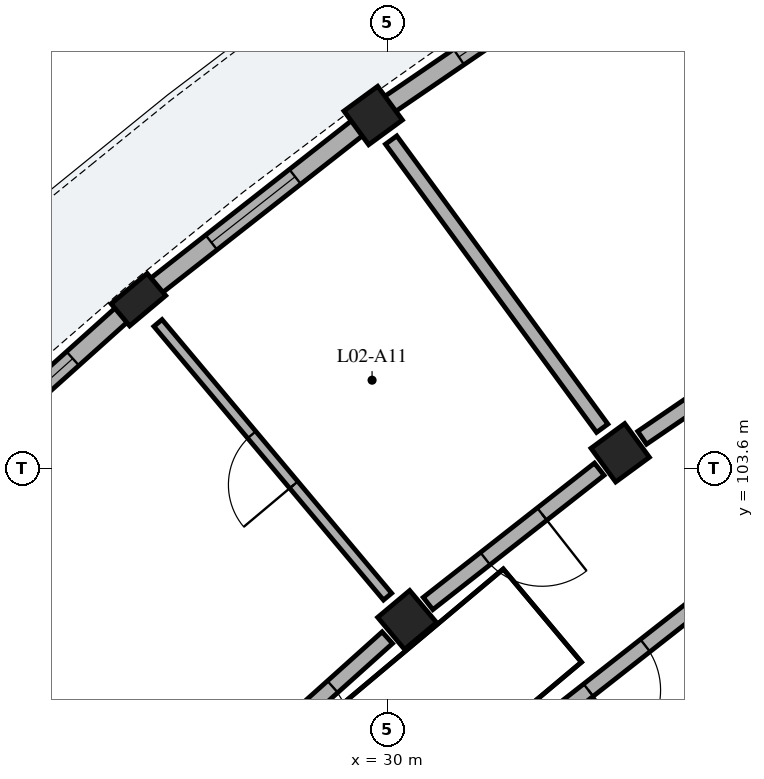
"""IFC4 building model, lengths in metres.
Left out: names, types, materials, properties, quantities, classifications, styles, units other than length and angle.
Written with IfcOpenShell. Run it as: python <this file> out.ifc"""

import sys

from ifc_helpers import new_model, si_unit, direction, frame, frame_2d, origin, origin_2d, place, context, subcontext, project, spatial, rectangle, extrude, element, fill, save


model = new_model("IFC4")
c1 = context("Model", 3, precision=1e-05, world=origin(), true_north=direction((0.0, 1.0)))
c2 = subcontext(c1, "Body", "Model", "MODEL_VIEW")
j1 = project(units=[si_unit("LENGTHUNIT", "METRE"), si_unit("PLANEANGLEUNIT", "RADIAN")], contexts=[c1])
p1 = place(None, origin())
s1 = spatial("IfcSite", under=j1, at=p1, CompositionType="ELEMENT")
p2 = place(p1, origin())
s2 = spatial("IfcBuilding", under=s1, at=p2, CompositionType="ELEMENT")
p3 = place(p2, frame((0.0, 0.0, 8.84)))
s3 = spatial("IfcBuildingStorey", under=s2, at=p3, CompositionType="ELEMENT", Elevation=8.84)
for number, where, z_axis, x_axis in (
    (1, (33.061, 103.804, 0.0), (0.0, 0.0, 1.0), (-0.591, 0.807, 0.0)),
    (2, (29.811, 108.241, 0.0), (0.0, 0.0, 1.0), (-0.591, 0.807, 0.0)),
    (3, (30.257, 101.605, 0.0), (0.0, 0.0, 1.0), (-0.643, 0.766, 0.0)),
):
    element("IfcColumn", number, at=place(p3, frame(where, z_axis=z_axis, x_axis=x_axis)), inside=s3, PredefinedType="COLUMN", context=c2, shape_type="SweptSolid", body=[
        extrude(rectangle(XDim=0.55, YDim=0.55, at=origin_2d()), origin(), (0.0, 0.0, 1.0), 3.105),
    ])
p4 = place(p3, frame((26.722, 105.818, 0.0), z_axis=(0.0, 0.0, 1.0), x_axis=(-0.642787636427, 0.766044420681, 0.0)))
e4 = element("IfcColumn", 4, at=p4, inside=s3, PredefinedType="PILASTER", context=c2, shape_type="SweptSolid", body=[
    extrude(rectangle(XDim=0.38, YDim=0.62, at=origin_2d()), origin(), (0.0, 0.0, 1.0), 3.105),
])
p5 = place(p3, frame((32.92, 110.365, 0.0), z_axis=(0.0, 0.0, 1.0), x_axis=(-0.825745840472, -0.56404238045, 0.0)))
e5 = element("IfcWall", 5, at=p5, inside=s3, PredefinedType="SOLIDWALL", context=c2, shape_type="SweptSolid", body=[
    extrude(rectangle(XDim=3.521, YDim=0.245, at=frame_2d((1.76, 0.0))), origin(), (0.0, 0.0, 1.0), 2.355),
])
p6 = place(p5, frame((1.12, 0.0, 0.55)))
e6 = element("IfcOpeningElement", 6, at=p6, cuts=e5, PredefinedType="OPENING", context=c2, shape_type="SweptSolid", body=[
    extrude(rectangle(XDim=1.28, YDim=1.56, at=frame_2d((0.64, 0.78))), frame((0.0, 0.133, 0.0), z_axis=(0.0, -1.0, 0.0), x_axis=(1.0, 0.0, 0.0)), (0.0, 0.0, 1.0), 0.265),
])
p7 = place(p3, frame((29.618, 108.09, 0.0), z_axis=(0.0, 0.0, 1.0), x_axis=(-0.786813798172, -0.617190446301, 0.0)))
e7 = element("IfcWall", 7, at=p7, inside=s3, PredefinedType="SOLIDWALL", context=c2, shape_type="SweptSolid", body=[
    extrude(rectangle(XDim=3.521, YDim=0.245, at=frame_2d((1.76, 0.0))), origin(), (0.0, 0.0, 1.0), 2.355),
])
p8 = place(p7, frame((1.06, 0.0, 0.55)))
e8 = element("IfcOpeningElement", 8, at=p8, cuts=e7, PredefinedType="OPENING", context=c2, shape_type="SweptSolid", body=[
    extrude(rectangle(XDim=1.4, YDim=1.635, at=frame_2d((0.7, 0.817))), frame((0.0, 0.133, 0.0), z_axis=(0.0, -1.0, 0.0), x_axis=(1.0, 0.0, 0.0)), (0.0, 0.0, 1.0), 0.265),
])
p9 = place(p3, frame((26.603, 105.711, 0.0), z_axis=(0.0, 0.0, 1.0), x_axis=(-0.744413726571, -0.667718656092, 0.0)))
e9 = element("IfcWall", 9, at=p9, inside=s3, PredefinedType="SOLIDWALL", context=c2, shape_type="SweptSolid", body=[
    extrude(rectangle(XDim=3.521, YDim=0.245, at=frame_2d((1.76, 0.0))), origin(), (0.0, 0.0, 1.0), 2.355),
])
p10 = place(p9, frame((1.0, 0.0, 0.55)))
e10 = element("IfcOpeningElement", 10, at=p10, cuts=e9, PredefinedType="OPENING", context=c2, shape_type="SweptSolid", body=[
    extrude(rectangle(XDim=1.52, YDim=1.485, at=frame_2d((0.76, 0.743))), frame((0.0, 0.133, 0.0), z_axis=(0.0, -1.0, 0.0), x_axis=(1.0, 0.0, 0.0)), (0.0, 0.0, 1.0), 0.265),
])
p11 = place(p3, frame((35.714, 105.616, 0.0), z_axis=(0.0, 0.0, 1.0), x_axis=(-0.825779671787, -0.563992848947, 0.0)))
e11 = element("IfcWall", 11, at=p11, inside=s3, PredefinedType="PARTITIONING", context=c2, shape_type="SweptSolid", body=[
    extrude(rectangle(XDim=2.863, YDim=0.205, at=frame_2d((1.432, 0.0))), origin(), (0.0, 0.0, 1.0), 2.37),
])
p12 = place(p11, frame((0.947, 0.0, 0.0)))
e12 = element("IfcOpeningElement", 12, at=p12, cuts=e11, PredefinedType="OPENING", context=c2, shape_type="SweptSolid", body=[
    extrude(rectangle(XDim=0.97, YDim=2.15, at=frame_2d((0.485, 1.075))), frame((0.0, 0.113, 0.0), z_axis=(0.0, -1.0, 0.0), x_axis=(1.0, 0.0, 0.0)), (0.0, 0.0, 1.0), 0.225),
])
p13 = place(p3, frame((32.824, 104.126, 0.0), z_axis=(0.0, 0.0, 1.0), x_axis=(-0.590910940129, 0.806736797745, 0.0)))
e13 = element("IfcWall", 13, at=p13, inside=s3, PredefinedType="PARTITIONING", context=c2, shape_type="SweptSolid", body=[
    extrude(rectangle(XDim=4.7, YDim=0.185, at=frame_2d((2.35, 0.0))), origin(), (0.0, 0.0, 1.0), 2.37),
])
p14 = place(p3, frame((32.785, 103.588, 0.0), z_axis=(0.0, 0.0, 1.0), x_axis=(-0.786806323554, -0.617199975061, 0.0)))
e14 = element("IfcWall", 14, at=p14, inside=s3, PredefinedType="PARTITIONING", context=c2, shape_type="SweptSolid", body=[
    extrude(rectangle(XDim=2.863, YDim=0.205, at=frame_2d((1.432, 0.0))), origin(), (0.0, 0.0, 1.0), 2.37),
])
p15 = place(p14, frame((0.957, 0.0, 0.0)))
e15 = element("IfcOpeningElement", 15, at=p15, cuts=e14, PredefinedType="OPENING", context=c2, shape_type="SweptSolid", body=[
    extrude(rectangle(XDim=0.95, YDim=2.13, at=frame_2d((0.475, 1.065))), frame((0.0, 0.113, 0.0), z_axis=(0.0, -1.0, 0.0), x_axis=(1.0, 0.0, 0.0)), (0.0, 0.0, 1.0), 0.225),
])
p16 = place(p3, frame((34.085, 101.813, 0.0), z_axis=(0.0, 0.0, 1.0), x_axis=(-0.786835457019, -0.617162833924, 0.0)))
e16 = element("IfcWall", 16, at=p16, inside=s3, PredefinedType="PARTITIONING", context=c2, shape_type="SweptSolid", body=[
    extrude(rectangle(XDim=2.718, YDim=0.205, at=frame_2d((1.359, 0.0))), origin(), (0.0, 0.0, 1.0), 2.37),
])
p17 = place(p16, frame((0.884, 0.0, 0.0)))
e17 = element("IfcOpeningElement", 17, at=p17, cuts=e16, PredefinedType="OPENING", context=c2, shape_type="SweptSolid", body=[
    extrude(rectangle(XDim=0.95, YDim=2.13, at=frame_2d((0.475, 1.065))), frame((0.0, 0.113, 0.0), z_axis=(0.0, -1.0, 0.0), x_axis=(1.0, 0.0, 0.0)), (0.0, 0.0, 1.0), 0.225),
])
p18 = place(p3, frame((30.0, 101.911, 0.0), z_axis=(0.0, 0.0, 1.0), x_axis=(-0.642811926223, 0.766024038465, 0.0)))
e18 = element("IfcWall", 18, at=p18, inside=s3, PredefinedType="PLUMBINGWALL", context=c2, shape_type="SweptSolid", body=[
    extrude(rectangle(XDim=4.7, YDim=0.14, at=frame_2d((2.35, 0.0))), origin(), (0.0, 0.0, 1.0), 2.37),
])
p19 = place(p18, frame((1.92, 0.0, 0.0)))
e19 = element("IfcOpeningElement", 19, at=p19, cuts=e18, PredefinedType="OPENING", context=c2, shape_type="SweptSolid", body=[
    extrude(rectangle(XDim=0.86, YDim=2.06, at=frame_2d((0.43, 1.03))), frame((0.0, 0.08, 0.0), z_axis=(0.0, -1.0, 0.0), x_axis=(1.0, 0.0, 0.0)), (0.0, 0.0, 1.0), 0.16),
])
p20 = place(p3, frame((29.997, 101.371, 0.0), z_axis=(0.0, 0.0, 1.0), x_axis=(-0.744433521088, -0.667696587291, 0.0)))
e20 = element("IfcWall", 20, at=p20, inside=s3, PredefinedType="PARTITIONING", context=c2, shape_type="SweptSolid", body=[
    extrude(rectangle(XDim=2.863, YDim=0.205, at=frame_2d((1.432, 0.0))), origin(), (0.0, 0.0, 1.0), 2.37),
])
p21 = place(p20, frame((0.967, 0.0, 0.0)))
e21 = element("IfcOpeningElement", 21, at=p21, cuts=e20, PredefinedType="OPENING", context=c2, shape_type="SweptSolid", body=[
    extrude(rectangle(XDim=0.93, YDim=2.12, at=frame_2d((0.465, 1.06))), frame((0.0, 0.113, 0.0), z_axis=(0.0, -1.0, 0.0), x_axis=(1.0, 0.0, 0.0)), (0.0, 0.0, 1.0), 0.225),
])
p22 = place(p6, origin())
e22 = element("IfcWindow", 22, at=p22, inside=s3, PartitioningType="SINGLE_PANEL", PredefinedType="WINDOW", context=c2, shape_type="SweptSolid", body=[
    extrude(rectangle(XDim=1.28, YDim=1.56, at=frame_2d((0.64, 0.78))), frame((0.0, 0.03, 0.0), z_axis=(0.0, -1.0, 0.0), x_axis=(1.0, 0.0, 0.0)), (0.0, 0.0, 1.0), 0.06),
])
fill(e6, e22)
p23 = place(p8, origin())
e23 = element("IfcWindow", 23, at=p23, inside=s3, PartitioningType="SINGLE_PANEL", PredefinedType="WINDOW", context=c2, shape_type="SweptSolid", body=[
    extrude(rectangle(XDim=1.4, YDim=1.635, at=frame_2d((0.7, 0.817))), frame((0.0, 0.03, 0.0), z_axis=(0.0, -1.0, 0.0), x_axis=(1.0, 0.0, 0.0)), (0.0, 0.0, 1.0), 0.06),
])
fill(e8, e23)
p24 = place(p10, origin())
e24 = element("IfcWindow", 24, at=p24, inside=s3, PartitioningType="SINGLE_PANEL", PredefinedType="WINDOW", context=c2, shape_type="SweptSolid", body=[
    extrude(rectangle(XDim=1.52, YDim=1.485, at=frame_2d((0.76, 0.743))), frame((0.0, 0.03, 0.0), z_axis=(0.0, -1.0, 0.0), x_axis=(1.0, 0.0, 0.0)), (0.0, 0.0, 1.0), 0.06),
])
fill(e10, e24)
p25 = place(p15, origin())
e25 = element("IfcDoor", 25, at=p25, inside=s3, OperationType="SINGLE_SWING_LEFT", PredefinedType="DOOR", context=c2, shape_type="SweptSolid", body=[
    extrude(rectangle(XDim=0.95, YDim=2.13, at=frame_2d((0.475, 1.065))), frame((0.0, 0.025, 0.0), z_axis=(0.0, -1.0, 0.0), x_axis=(1.0, 0.0, 0.0)), (0.0, 0.0, 1.0), 0.05),
])
fill(e15, e25)
p26 = place(p17, origin())
e26 = element("IfcDoor", 26, at=p26, inside=s3, OperationType="SINGLE_SWING_RIGHT", PredefinedType="DOOR", context=c2, shape_type="SweptSolid", body=[
    extrude(rectangle(XDim=0.95, YDim=2.13, at=frame_2d((0.475, 1.065))), frame((0.0, 0.025, 0.0), z_axis=(0.0, -1.0, 0.0), x_axis=(1.0, 0.0, 0.0)), (0.0, 0.0, 1.0), 0.05),
])
fill(e17, e26)
p27 = place(p19, origin())
e27 = element("IfcDoor", 27, at=p27, inside=s3, OperationType="SINGLE_SWING_LEFT", PredefinedType="DOOR", context=c2, shape_type="SweptSolid", body=[
    extrude(rectangle(XDim=0.86, YDim=2.06, at=frame_2d((0.43, 1.03))), frame((0.0, 0.025, 0.0), z_axis=(0.0, -1.0, 0.0), x_axis=(1.0, 0.0, 0.0)), (0.0, 0.0, 1.0), 0.05),
])
fill(e19, e27)
p28 = place(p21, origin())
e28 = element("IfcDoor", 28, at=p28, inside=s3, OperationType="SINGLE_SWING_RIGHT", PredefinedType="DOOR", context=c2, shape_type="SweptSolid", body=[
    extrude(rectangle(XDim=0.93, YDim=2.12, at=frame_2d((0.465, 1.06))), frame((0.0, 0.025, 0.0), z_axis=(0.0, -1.0, 0.0), x_axis=(1.0, 0.0, 0.0)), (0.0, 0.0, 1.0), 0.05),
])
fill(e21, e28)
save(model, sys.argv[1])
